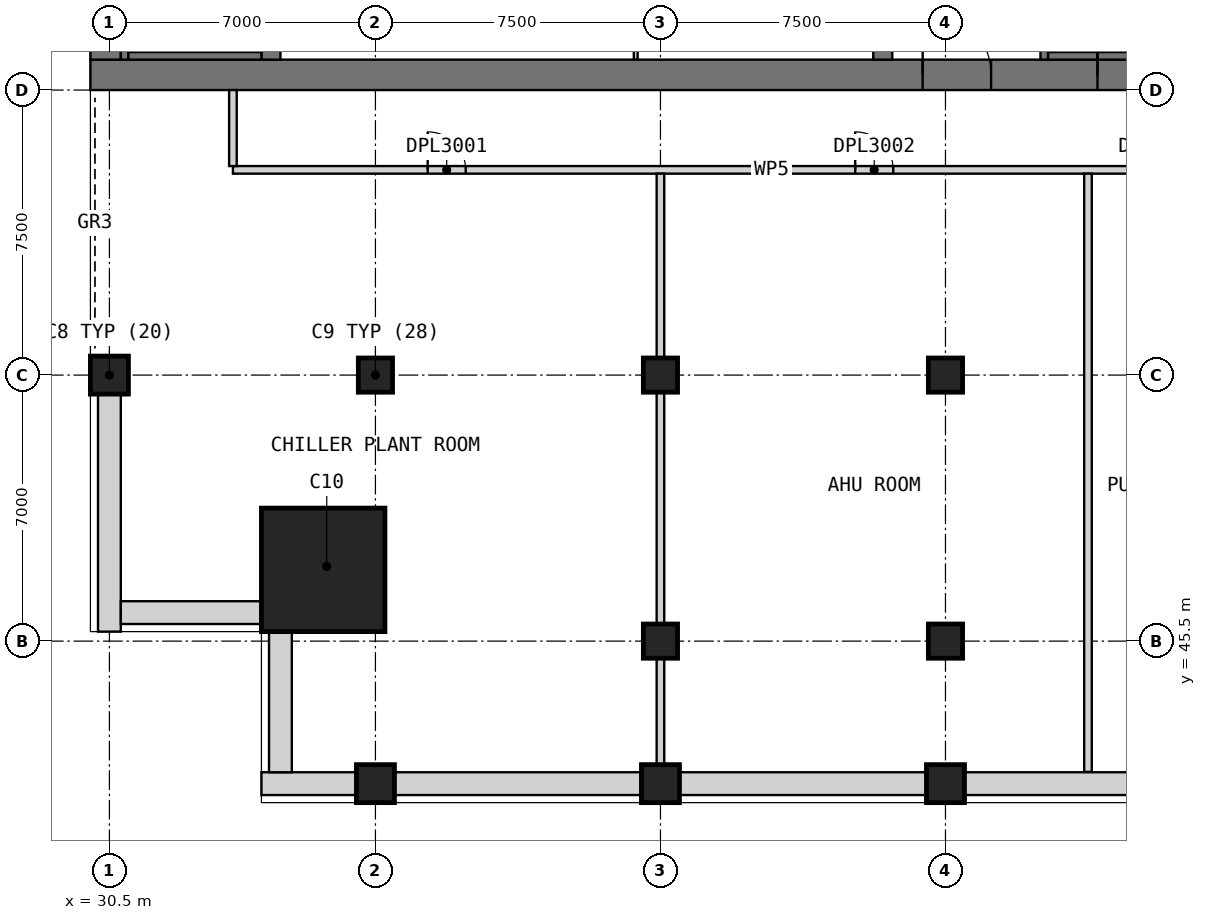
"""IFC4 building model, lengths in metres.
Left out: names, types, materials, properties, quantities, classifications, styles, units other than length and angle.
Written with IfcOpenShell. Run it as: python <this file> out.ifc"""

import sys

from ifc_helpers import new_model, si_unit, direction, frame, frame_2d, origin, origin_2d, place, context, subcontext, project, spatial, rectangle, extrude, element, fill, save


model = new_model("IFC4")
c1 = context("Model", 3, precision=1e-05, world=origin(), true_north=direction((0.0, 1.0)))
c2 = subcontext(c1, "Body", "Model", "MODEL_VIEW")
j1 = project(units=[si_unit("LENGTHUNIT", "METRE"), si_unit("PLANEANGLEUNIT", "RADIAN")], contexts=[c1])
p1 = place(None, origin())
s1 = spatial("IfcSite", under=j1, at=p1, CompositionType="ELEMENT")
p2 = place(p1, origin())
s2 = spatial("IfcBuilding", under=s1, at=p2, CompositionType="ELEMENT")
p3 = place(p2, frame((0.0, 0.0, 214.2)))
s3 = spatial("IfcBuildingStorey", under=s2, at=p3, CompositionType="ELEMENT", Elevation=214.2)
for number, where, z_axis, x_axis in (
    (1, (37.5, 41.75, 0.0), (0.0, 0.0, 1.0), (1.0, 0.0, 0.0)),
    (2, (45.0, 41.75, 0.0), (0.0, 0.0, 1.0), (1.0, 0.0, 0.0)),
    (3, (52.5, 41.75, 0.0), (0.0, 0.0, 1.0), (1.0, 0.0, 0.0)),
    (4, (30.5, 52.5, 0.0), (0.0, 0.0, 1.0), (1.0, 0.0, 0.0)),
):
    element("IfcColumn", number, at=place(p3, frame(where, z_axis=z_axis, x_axis=x_axis)), inside=s3, PredefinedType="COLUMN", context=c2, shape_type="SweptSolid", body=[
        extrude(rectangle(XDim=1.0, YDim=1.0, at=origin_2d()), origin(), (0.0, 0.0, 1.0), 5.5),
    ])
for number, where, z_axis, x_axis in (
    (5, (37.5, 52.5, 0.0), (0.0, 0.0, 1.0), (1.0, 0.0, 0.0)),
    (6, (45.0, 45.5, 0.0), (0.0, 0.0, 1.0), (1.0, 0.0, 0.0)),
    (7, (45.0, 52.5, 0.0), (0.0, 0.0, 1.0), (1.0, 0.0, 0.0)),
    (8, (52.5, 45.5, 0.0), (0.0, 0.0, 1.0), (1.0, 0.0, 0.0)),
    (9, (52.5, 52.5, 0.0), (0.0, 0.0, 1.0), (1.0, 0.0, 0.0)),
):
    element("IfcColumn", number, at=place(p3, frame(where, z_axis=z_axis, x_axis=x_axis)), inside=s3, PredefinedType="COLUMN", context=c2, shape_type="SweptSolid", body=[
        extrude(rectangle(XDim=0.9, YDim=0.9, at=origin_2d()), origin(), (0.0, 0.0, 1.0), 5.5),
    ])
p4 = place(p3, frame((36.125, 47.375, 0.0), z_axis=(0.0, 0.0, 1.0), x_axis=(1.0, 0.0, 0.0)))
e10 = element("IfcColumn", 10, at=p4, inside=s3, PredefinedType="COLUMN", context=c2, shape_type="SweptSolid", body=[
    extrude(rectangle(XDim=3.25, YDim=3.25, at=origin_2d()), origin(), (0.034, 0.034, 0.999), 5.506),
])
p5 = place(p3, frame((30.0, 60.4, 0.0), z_axis=(0.0, 0.0, 1.0), x_axis=(1.0, 0.0, 0.0)))
e11 = element("IfcWall", 11, at=p5, inside=s3, PredefinedType="SHEAR", context=c2, shape_type="SweptSolid", body=[
    extrude(rectangle(XDim=30.0, YDim=0.8, at=frame_2d((15.0, 0.0))), origin(), (0.0, 0.0, 1.0), 5.5),
])
p6 = place(p5, frame((21.9, 0.0, 0.0)))
e12 = element("IfcOpeningElement", 12, at=p6, cuts=e11, PredefinedType="OPENING", context=c2, shape_type="SweptSolid", body=[
    extrude(rectangle(XDim=1.8, YDim=2.1, at=frame_2d((0.9, 1.05))), frame((0.0, 0.41, 0.0), z_axis=(0.0, -1.0, 0.0), x_axis=(1.0, 0.0, 0.0)), (0.0, 0.0, 1.0), 0.82),
])
p7 = place(p5, frame((26.5, 0.0, 0.0)))
e13 = element("IfcOpeningElement", 13, at=p7, cuts=e11, PredefinedType="OPENING", context=c2, shape_type="SweptSolid", body=[
    extrude(rectangle(XDim=1.2, YDim=2.1, at=frame_2d((0.6, 1.05))), frame((0.0, 0.41, 0.0), z_axis=(0.0, -1.0, 0.0), x_axis=(1.0, 0.0, 0.0)), (0.0, 0.0, 1.0), 0.82),
])
p8 = place(p3, frame((30.4, 60.8, 0.0), z_axis=(0.0, 0.0, 1.0), x_axis=(0.0, 1.0, 0.0)))
e14 = element("IfcWall", 14, at=p8, inside=s3, PredefinedType="SHEAR", context=c2, shape_type="SweptSolid", body=[
    extrude(rectangle(XDim=20.9, YDim=0.8, at=frame_2d((10.45, 0.0))), origin(), (0.0, 0.0, 1.0), 5.5),
])
for number, where, z_axis, x_axis in (
    (15, (34.75, 60.8, 0.0), (0.0, 0.0, 1.0), (0.0, 1.0, 0.0)),
    (16, (50.85, 60.8, 0.0), (0.0, 0.0, 1.0), (0.0, 1.0, 0.0)),
):
    element("IfcWall", number, at=place(p3, frame(where, z_axis=z_axis, x_axis=x_axis)), inside=s3, PredefinedType="SHEAR", context=c2, shape_type="SweptSolid", body=[
        extrude(rectangle(XDim=3.4, YDim=0.5, at=frame_2d((1.7, 0.0))), origin(), (0.0, 0.0, 1.0), 5.5),
    ])
p9 = place(p3, frame((34.5, 41.75, 0.0), z_axis=(0.0, 0.0, 1.0), x_axis=(1.0, 0.0, 0.0)))
e17 = element("IfcWall", 17, at=p9, inside=s3, PredefinedType="ELEMENTEDWALL", context=c2, shape_type="SweptSolid", body=[
    extrude(rectangle(XDim=2.5, YDim=0.6, at=frame_2d((1.25, 0.0))), origin(), (0.0, 0.0, 1.0), 5.25),
])
for number, where, z_axis, x_axis in (
    (18, (38.0, 41.75, 0.0), (0.0, 0.0, 1.0), (1.0, 0.0, 0.0)),
    (19, (45.5, 41.75, 0.0), (0.0, 0.0, 1.0), (1.0, 0.0, 0.0)),
    (20, (53.0, 41.75, 0.0), (0.0, 0.0, 1.0), (1.0, 0.0, 0.0)),
):
    element("IfcWall", number, at=place(p3, frame(where, z_axis=z_axis, x_axis=x_axis)), inside=s3, PredefinedType="ELEMENTEDWALL", context=c2, shape_type="SweptSolid", body=[
        extrude(rectangle(XDim=6.5, YDim=0.6, at=frame_2d((3.25, 0.0))), origin(), (0.0, 0.0, 1.0), 4.75),
    ])
p10 = place(p3, frame((30.5, 52.0, 0.0), z_axis=(0.0, 0.0, 1.0), x_axis=(0.0, -1.0, 0.0)))
e21 = element("IfcWall", 21, at=p10, inside=s3, PredefinedType="ELEMENTEDWALL", context=c2, shape_type="SweptSolid", body=[
    extrude(rectangle(XDim=6.25, YDim=0.6, at=frame_2d((3.125, 0.0))), origin(), (0.0, 0.0, 1.0), 4.75),
])
for number, where, z_axis, x_axis in (
    (22, (30.8, 46.25, 0.0), (0.0, 0.0, 1.0), (1.0, 0.0, 0.0)),
    (23, (35.0, 45.75, 0.0), (0.0, 0.0, 1.0), (0.0, -1.0, 0.0)),
):
    element("IfcWall", number, at=place(p3, frame(where, z_axis=z_axis, x_axis=x_axis)), inside=s3, PredefinedType="ELEMENTEDWALL", context=c2, shape_type="SweptSolid", body=[
        extrude(rectangle(XDim=3.7, YDim=0.6, at=frame_2d((1.85, 0.0))), origin(), (0.0, 0.0, 1.0), 5.25),
    ])
p11 = place(p3, frame((44.35, 60.8, 0.0), z_axis=(0.0, 0.0, 1.0), x_axis=(0.0, 1.0, 0.0)))
e24 = element("IfcWall", 24, at=p11, inside=s3, PredefinedType="PARTITIONING", context=c2, shape_type="SweptSolid", body=[
    extrude(rectangle(XDim=3.2, YDim=0.1, at=frame_2d((1.6, 0.0))), origin(), (0.0, 0.0, 1.0), 5.25),
])
p12 = place(p3, frame((55.1, 60.8, 0.0), z_axis=(0.0, 0.0, 1.0), x_axis=(0.0, 1.0, 0.0)))
e25 = element("IfcWall", 25, at=p12, inside=s3, PredefinedType="SOLIDWALL", context=c2, shape_type="SweptSolid", body=[
    extrude(rectangle(XDim=7.8, YDim=0.2, at=frame_2d((3.9, 0.0))), origin(), (0.0, 0.0, 1.0), 5.25),
])
p13 = place(p3, frame((30.9, 60.8, 0.0), z_axis=(0.0, 0.0, 1.0), x_axis=(0.0, 1.0, 0.0)))
e26 = element("IfcWall", 26, at=p13, inside=s3, PredefinedType="SOLIDWALL", context=c2, shape_type="SweptSolid", body=[
    extrude(rectangle(XDim=20.9, YDim=0.2, at=frame_2d((10.45, 0.0))), origin(), (0.0, 0.0, 1.0), 5.25),
])
p14 = place(p3, frame((31.0, 60.9, 0.0), z_axis=(0.0, 0.0, 1.0), x_axis=(1.0, 0.0, 0.0)))
e27 = element("IfcWall", 27, at=p14, inside=s3, PredefinedType="SOLIDWALL", context=c2, shape_type="SweptSolid", body=[
    extrude(rectangle(XDim=3.5, YDim=0.2, at=frame_2d((1.75, 0.0))), origin(), (0.0, 0.0, 1.0), 5.25),
])
p15 = place(p3, frame((55.2, 60.9, 0.0), z_axis=(0.0, 0.0, 1.0), x_axis=(1.0, 0.0, 0.0)))
e28 = element("IfcWall", 28, at=p15, inside=s3, PredefinedType="SOLIDWALL", context=c2, shape_type="SweptSolid", body=[
    extrude(rectangle(XDim=1.3, YDim=0.2, at=frame_2d((0.65, 0.0))), origin(), (0.0, 0.0, 1.0), 5.25),
])
p16 = place(p3, frame((56.5, 60.9, 3.2), z_axis=(0.0, 0.0, 1.0), x_axis=(1.0, 0.0, 0.0)))
e29 = element("IfcWall", 29, at=p16, inside=s3, PredefinedType="SOLIDWALL", context=c2, shape_type="SweptSolid", body=[
    extrude(rectangle(XDim=1.2, YDim=0.2, at=frame_2d((0.6, 0.0))), origin(), (0.0, 0.0, 1.0), 2.05),
])
p17 = place(p3, frame((33.75, 57.9, 0.0), z_axis=(0.0, 0.0, 1.0), x_axis=(1.0, 0.0, 0.0)))
e30 = element("IfcWall", 30, at=p17, inside=s3, PredefinedType="PARTITIONING", context=c2, shape_type="SweptSolid", body=[
    extrude(rectangle(XDim=28.35, YDim=0.2, at=frame_2d((14.175, 0.0))), origin(), (0.0, 0.0, 1.0), 5.25),
])
p18 = place(p17, frame((5.125, 0.0, 0.0)))
e31 = element("IfcOpeningElement", 31, at=p18, cuts=e30, PredefinedType="OPENING", context=c2, shape_type="SweptSolid", body=[
    extrude(rectangle(XDim=1.0, YDim=2.1, at=frame_2d((0.5, 1.05))), frame((0.0, 0.11, 0.0), z_axis=(0.0, -1.0, 0.0), x_axis=(1.0, 0.0, 0.0)), (0.0, 0.0, 1.0), 0.22),
])
p19 = place(p17, frame((16.375, 0.0, 0.0)))
e32 = element("IfcOpeningElement", 32, at=p19, cuts=e30, PredefinedType="OPENING", context=c2, shape_type="SweptSolid", body=[
    extrude(rectangle(XDim=1.0, YDim=2.1, at=frame_2d((0.5, 1.05))), frame((0.0, 0.11, 0.0), z_axis=(0.0, -1.0, 0.0), x_axis=(1.0, 0.0, 0.0)), (0.0, 0.0, 1.0), 0.22),
])
p20 = place(p17, frame((23.875, 0.0, 0.0)))
e33 = element("IfcOpeningElement", 33, at=p20, cuts=e30, PredefinedType="OPENING", context=c2, shape_type="SweptSolid", body=[
    extrude(rectangle(XDim=1.0, YDim=2.1, at=frame_2d((0.5, 1.05))), frame((0.0, 0.11, 0.0), z_axis=(0.0, -1.0, 0.0), x_axis=(1.0, 0.0, 0.0)), (0.0, 0.0, 1.0), 0.22),
])
p21 = place(p17, frame((26.8, 0.0, 0.0)))
e34 = element("IfcOpeningElement", 34, at=p21, cuts=e30, PredefinedType="OPENING", context=c2, shape_type="SweptSolid", body=[
    extrude(rectangle(XDim=1.0, YDim=2.1, at=frame_2d((0.5, 1.05))), frame((0.0, 0.11, 0.0), z_axis=(0.0, -1.0, 0.0), x_axis=(1.0, 0.0, 0.0)), (0.0, 0.0, 1.0), 0.22),
])
p22 = place(p3, frame((33.75, 58.0, 0.0), z_axis=(0.0, 0.0, 1.0), x_axis=(0.0, 1.0, 0.0)))
e35 = element("IfcWall", 35, at=p22, inside=s3, PredefinedType="PARTITIONING", context=c2, shape_type="SweptSolid", body=[
    extrude(rectangle(XDim=2.0, YDim=0.2, at=frame_2d((1.0, 0.0))), origin(), (0.0, 0.0, 1.0), 5.25),
])
p23 = place(p3, frame((45.0, 41.25, 0.0), z_axis=(0.0, 0.0, 1.0), x_axis=(0.0, 1.0, 0.0)))
e36 = element("IfcWall", 36, at=p23, inside=s3, PredefinedType="PARTITIONING", context=c2, shape_type="SweptSolid", body=[
    extrude(rectangle(XDim=16.55, YDim=0.2, at=frame_2d((8.275, 0.0))), origin(), (0.0, 0.0, 1.0), 5.25),
])
p24 = place(p3, frame((56.25, 42.06, 0.0), z_axis=(0.0, 0.0, 1.0), x_axis=(0.0, 1.0, 0.0)))
e37 = element("IfcWall", 37, at=p24, inside=s3, PredefinedType="PARTITIONING", context=c2, shape_type="SweptSolid", body=[
    extrude(rectangle(XDim=15.74, YDim=0.2, at=frame_2d((7.87, 0.0))), origin(), (0.0, 0.0, 1.0), 5.25),
])
p25 = place(p6, origin())
e38 = element("IfcDoor", 38, at=p25, inside=s3, OperationType="DOUBLE_DOOR_SINGLE_SWING", PredefinedType="DOOR", context=c2, shape_type="SweptSolid", body=[
    extrude(rectangle(XDim=1.8, YDim=2.1, at=frame_2d((0.9, 1.05))), frame((0.0, 0.025, 0.0), z_axis=(0.0, -1.0, 0.0), x_axis=(1.0, 0.0, 0.0)), (0.0, 0.0, 1.0), 0.05),
])
fill(e12, e38)
p26 = place(p7, origin())
e39 = element("IfcDoor", 39, at=p26, inside=s3, OperationType="SINGLE_SWING_LEFT", PredefinedType="DOOR", context=c2, shape_type="SweptSolid", body=[
    extrude(rectangle(XDim=1.2, YDim=2.1, at=frame_2d((0.6, 1.05))), frame((0.0, 0.025, 0.0), z_axis=(0.0, -1.0, 0.0), x_axis=(1.0, 0.0, 0.0)), (0.0, 0.0, 1.0), 0.05),
])
fill(e13, e39)
p27 = place(p18, origin())
e40 = element("IfcDoor", 40, at=p27, inside=s3, OperationType="SINGLE_SWING_RIGHT", PredefinedType="DOOR", context=c2, shape_type="SweptSolid", body=[
    extrude(rectangle(XDim=1.0, YDim=2.1, at=frame_2d((0.5, 1.05))), frame((0.0, 0.025, 0.0), z_axis=(0.0, -1.0, 0.0), x_axis=(1.0, 0.0, 0.0)), (0.0, 0.0, 1.0), 0.05),
])
fill(e31, e40)
p28 = place(p19, origin())
e41 = element("IfcDoor", 41, at=p28, inside=s3, OperationType="SINGLE_SWING_RIGHT", PredefinedType="DOOR", context=c2, shape_type="SweptSolid", body=[
    extrude(rectangle(XDim=1.0, YDim=2.1, at=frame_2d((0.5, 1.05))), frame((0.0, 0.025, 0.0), z_axis=(0.0, -1.0, 0.0), x_axis=(1.0, 0.0, 0.0)), (0.0, 0.0, 1.0), 0.05),
])
fill(e32, e41)
save(model, sys.argv[1])
